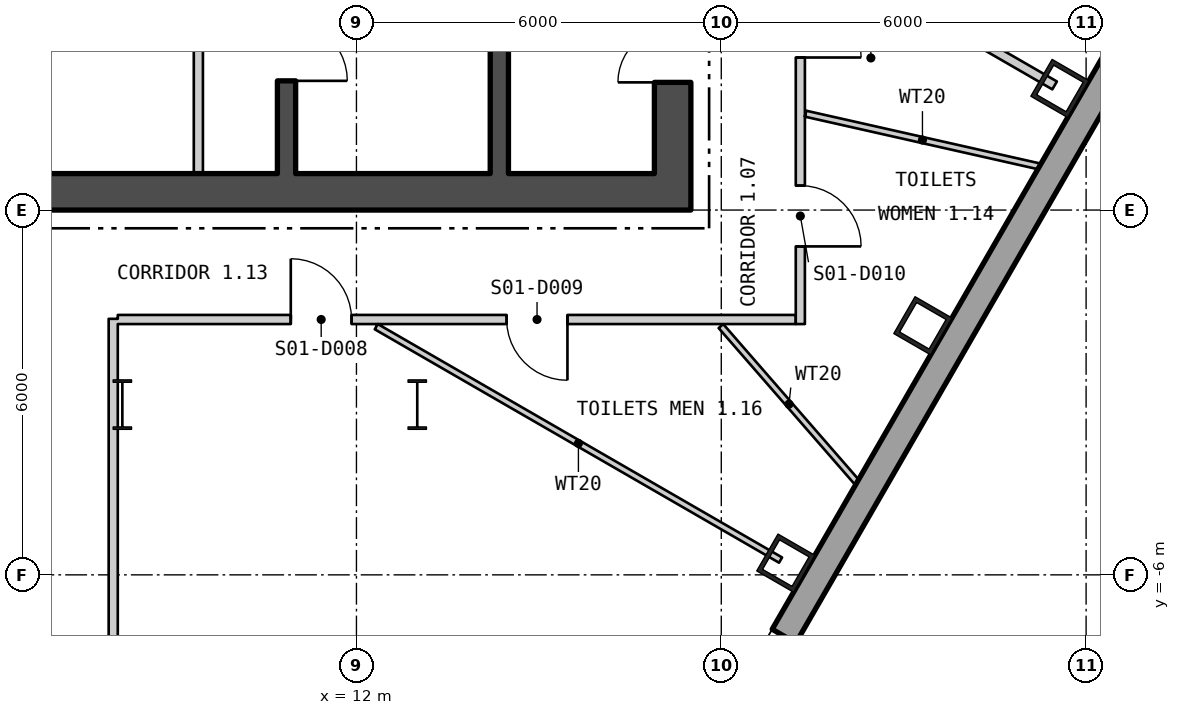
"""IFC4 building model, lengths in metres.
Left out: names, types, materials, properties, quantities, classifications, styles, units other than length and angle.
Written with IfcOpenShell. Run it as: python <this file> out.ifc"""

import sys

from ifc_helpers import new_model, si_unit, direction, frame, frame_2d, origin, origin_2d, place, context, subcontext, project, spatial, polyline, rectangle, hollow_rectangle, i_section, outline, extrude, element, fill, save


model = new_model("IFC4")
c1 = context("Model", 3, precision=1e-05, world=origin(), true_north=direction((0.0, 1.0)))
c2 = subcontext(c1, "Body", "Model", "MODEL_VIEW")
j1 = project(units=[si_unit("LENGTHUNIT", "METRE"), si_unit("PLANEANGLEUNIT", "RADIAN")], contexts=[c1])
p1 = place(None, origin())
s1 = spatial("IfcSite", under=j1, at=p1, CompositionType="ELEMENT")
p2 = place(p1, origin())
s2 = spatial("IfcBuilding", under=s1, at=p2, CompositionType="ELEMENT")
p3 = place(p2, frame((0.0, 0.0, 28.8)))
s3 = spatial("IfcBuildingStorey", under=s2, at=p3, CompositionType="ELEMENT", Elevation=28.8)
p4 = place(p3, frame((19.061, -5.807, 0.0), z_axis=(0.0, 0.0, 1.0), x_axis=(0.5, 0.866025403784, 0.0)))
e1 = element("IfcColumn", 1, at=p4, inside=s3, PredefinedType="COLUMN", context=c2, shape_type="SweptSolid", body=[
    extrude(hollow_rectangle(XDim=0.7, YDim=0.7, WallThickness=0.07, at=origin_2d()), origin(), (0.0, 0.0, 1.0), 4.5),
])
p5 = place(p3, frame((21.315, -1.903, -0.85), z_axis=(0.0, 0.0, 1.0), x_axis=(0.5, 0.866025403784, 0.0)))
e2 = element("IfcColumn", 2, at=p5, inside=s3, PredefinedType="COLUMN", context=c2, shape_type="SweptSolid", body=[
    extrude(hollow_rectangle(XDim=0.7, YDim=0.7, WallThickness=0.07, at=origin_2d()), origin(), (0.0, 0.0, 1.0), 5.35),
])
p6 = place(p3, frame((23.569, 2.0, 0.0), z_axis=(0.0, 0.0, 1.0), x_axis=(0.5, 0.866025403784, 0.0)))
e3 = element("IfcColumn", 3, at=p6, inside=s3, PredefinedType="COLUMN", context=c2, shape_type="SweptSolid", body=[
    extrude(hollow_rectangle(XDim=0.7, YDim=0.7, WallThickness=0.07, at=origin_2d()), origin(), (0.0, 0.0, 1.0), 4.5),
])
for number, where, z_axis, x_axis in (
    (4, (8.15, -3.2, 0.0), (0.0, 0.0, 1.0), (1.0, 0.0, 0.0)),
    (5, (13.0, -3.2, 0.0), (0.0, 0.0, 1.0), (1.0, 0.0, 0.0)),
):
    element("IfcColumn", number, at=place(p3, frame(where, z_axis=z_axis, x_axis=x_axis)), inside=s3, PredefinedType="COLUMN", context=c2, shape_type="SweptSolid", body=[
        extrude(i_section(OverallWidth=0.303, OverallDepth=0.814, WebThickness=0.021, FlangeThickness=0.04, at=origin_2d()), origin(), (0.0, 0.0, 1.0), 4.5),
    ])
p7 = place(p3, frame((5.87, -29.805, -0.23), z_axis=(0.0, 0.0, 1.0), x_axis=(0.499999764979, 0.866025539474, 0.0)))
e6 = element("IfcWall", 6, at=p7, inside=s3, PredefinedType="SOLIDWALL", context=c2, shape_type="SweptSolid", body=[
    extrude(outline(polyline([(-0.13, -0.225), (45.87, -0.225), (45.61, 0.225), (0.13, 0.225), (-0.13, -0.225)])), origin(), (0.0, 0.0, 1.0), 4.55),
])
p8 = place(p7, frame((1.424, 0.0, 1.13)))
e7 = element("IfcOpeningElement", 7, at=p8, cuts=e6, PredefinedType="OPENING", context=c2, shape_type="SweptSolid", body=[
    extrude(rectangle(XDim=2.4, YDim=2.6, at=frame_2d((1.2, 1.3))), frame((0.0, 0.235, 0.0), z_axis=(0.0, -1.0, 0.0), x_axis=(1.0, 0.0, 0.0)), (0.0, 0.0, 1.0), 0.47),
])
p9 = place(p7, frame((5.893, 0.0, 1.13)))
e8 = element("IfcOpeningElement", 8, at=p9, cuts=e6, PredefinedType="OPENING", context=c2, shape_type="SweptSolid", body=[
    extrude(rectangle(XDim=2.4, YDim=2.6, at=frame_2d((1.2, 1.3))), frame((0.0, 0.235, 0.0), z_axis=(0.0, -1.0, 0.0), x_axis=(1.0, 0.0, 0.0)), (0.0, 0.0, 1.0), 0.47),
])
p10 = place(p7, frame((10.701, 0.0, 0.23)))
e9 = element("IfcOpeningElement", 9, at=p10, cuts=e6, PredefinedType="OPENING", context=c2, shape_type="SweptSolid", body=[
    extrude(rectangle(XDim=1.8, YDim=2.4, at=frame_2d((0.9, 1.2))), frame((0.0, 0.235, 0.0), z_axis=(0.0, -1.0, 0.0), x_axis=(1.0, 0.0, 0.0)), (0.0, 0.0, 1.0), 0.47),
])
p11 = place(p7, frame((14.909, 0.0, 1.13)))
e10 = element("IfcOpeningElement", 10, at=p11, cuts=e6, PredefinedType="OPENING", context=c2, shape_type="SweptSolid", body=[
    extrude(rectangle(XDim=2.4, YDim=2.6, at=frame_2d((1.2, 1.3))), frame((0.0, 0.235, 0.0), z_axis=(0.0, -1.0, 0.0), x_axis=(1.0, 0.0, 0.0)), (0.0, 0.0, 1.0), 0.47),
])
p12 = place(p7, frame((19.416, 0.0, 1.13)))
e11 = element("IfcOpeningElement", 11, at=p12, cuts=e6, PredefinedType="OPENING", context=c2, shape_type="SweptSolid", body=[
    extrude(rectangle(XDim=2.4, YDim=2.6, at=frame_2d((1.2, 1.3))), frame((0.0, 0.235, 0.0), z_axis=(0.0, -1.0, 0.0), x_axis=(1.0, 0.0, 0.0)), (0.0, 0.0, 1.0), 0.47),
])
p13 = place(p7, frame((23.924, 0.0, 1.13)))
e12 = element("IfcOpeningElement", 12, at=p13, cuts=e6, PredefinedType="OPENING", context=c2, shape_type="SweptSolid", body=[
    extrude(rectangle(XDim=2.4, YDim=2.6, at=frame_2d((1.2, 1.3))), frame((0.0, 0.235, 0.0), z_axis=(0.0, -1.0, 0.0), x_axis=(1.0, 0.0, 0.0)), (0.0, 0.0, 1.0), 0.47),
])
p14 = place(p7, frame((37.447, 0.0, 1.13)))
e13 = element("IfcOpeningElement", 13, at=p14, cuts=e6, PredefinedType="OPENING", context=c2, shape_type="SweptSolid", body=[
    extrude(rectangle(XDim=2.4, YDim=2.6, at=frame_2d((1.2, 1.3))), frame((0.0, 0.235, 0.0), z_axis=(0.0, -1.0, 0.0), x_axis=(1.0, 0.0, 0.0)), (0.0, 0.0, 1.0), 0.47),
])
p15 = place(p7, frame((42.216, 0.0, 0.23)))
e14 = element("IfcOpeningElement", 14, at=p15, cuts=e6, PredefinedType="OPENING", context=c2, shape_type="SweptSolid", body=[
    extrude(rectangle(XDim=1.8, YDim=2.4, at=frame_2d((0.9, 1.2))), frame((0.0, 0.235, 0.0), z_axis=(0.0, -1.0, 0.0), x_axis=(1.0, 0.0, 0.0)), (0.0, 0.0, 1.0), 0.47),
])
p16 = place(p3, frame((-17.5, 0.3, 0.0), z_axis=(0.0, 0.0, 1.0), x_axis=(1.0, 0.0, 0.0)))
e15 = element("IfcWall", 15, at=p16, inside=s3, PredefinedType="SHEAR", context=c2, shape_type="SweptSolid", body=[
    extrude(rectangle(XDim=35.0, YDim=0.6, at=frame_2d((17.5, 0.0))), origin(), (0.0, 0.0, 1.0), 4.3),
])
p17 = place(p16, frame((12.0, 0.0, 0.0)))
e16 = element("IfcOpeningElement", 16, at=p17, cuts=e15, PredefinedType="OPENING", context=c2, shape_type="SweptSolid", body=[
    extrude(rectangle(XDim=1.8, YDim=2.4, at=frame_2d((0.9, 1.2))), frame((0.0, 0.31, 0.0), z_axis=(0.0, -1.0, 0.0), x_axis=(1.0, 0.0, 0.0)), (0.0, 0.0, 1.0), 0.62),
])
p18 = place(p16, frame((22.0, 0.0, 0.0)))
e17 = element("IfcOpeningElement", 17, at=p18, cuts=e15, PredefinedType="OPENING", context=c2, shape_type="SweptSolid", body=[
    extrude(rectangle(XDim=1.8, YDim=2.4, at=frame_2d((0.9, 1.2))), frame((0.0, 0.31, 0.0), z_axis=(0.0, -1.0, 0.0), x_axis=(1.0, 0.0, 0.0)), (0.0, 0.0, 1.0), 0.62),
])
p19 = place(p3, frame((17.2, 0.6, 0.0), z_axis=(0.0, 0.0, 1.0), x_axis=(0.0, 1.0, 0.0)))
e18 = element("IfcWall", 18, at=p19, inside=s3, PredefinedType="SHEAR", context=c2, shape_type="SweptSolid", body=[
    extrude(rectangle(XDim=16.8, YDim=0.6, at=frame_2d((8.4, 0.0))), origin(), (0.0, 0.0, 1.0), 4.3),
])
p20 = place(p19, frame((5.7, 0.0, 0.0)))
e19 = element("IfcOpeningElement", 19, at=p20, cuts=e18, PredefinedType="OPENING", context=c2, shape_type="SweptSolid", body=[
    extrude(rectangle(XDim=1.5, YDim=2.1, at=frame_2d((0.75, 1.05))), frame((0.0, 0.31, 0.0), z_axis=(0.0, -1.0, 0.0), x_axis=(1.0, 0.0, 0.0)), (0.0, 0.0, 1.0), 0.62),
])
p21 = place(p19, frame((1.5, 0.0, 0.0)))
e20 = element("IfcOpeningElement", 20, at=p21, cuts=e18, PredefinedType="OPENING", context=c2, shape_type="SweptSolid", body=[
    extrude(rectangle(XDim=0.9, YDim=2.1, at=frame_2d((0.45, 1.05))), frame((0.0, 0.31, 0.0), z_axis=(0.0, -1.0, 0.0), x_axis=(1.0, 0.0, 0.0)), (0.0, 0.0, 1.0), 0.62),
])
p22 = place(p19, frame((4.3, 0.0, 0.0)))
e21 = element("IfcOpeningElement", 21, at=p22, cuts=e18, PredefinedType="OPENING", context=c2, shape_type="SweptSolid", body=[
    extrude(rectangle(XDim=1.0, YDim=2.1, at=frame_2d((0.5, 1.05))), frame((0.0, 0.31, 0.0), z_axis=(0.0, -1.0, 0.0), x_axis=(1.0, 0.0, 0.0)), (0.0, 0.0, 1.0), 0.62),
])
p23 = place(p19, frame((8.613, 0.0, 0.0)))
e22 = element("IfcOpeningElement", 22, at=p23, cuts=e18, PredefinedType="OPENING", context=c2, shape_type="SweptSolid", body=[
    extrude(rectangle(XDim=0.9, YDim=2.1, at=frame_2d((0.45, 1.05))), frame((0.0, 0.31, 0.0), z_axis=(0.0, -1.0, 0.0), x_axis=(1.0, 0.0, 0.0)), (0.0, 0.0, 1.0), 0.62),
])
p24 = place(p19, frame((13.413, 0.0, 0.0)))
e23 = element("IfcOpeningElement", 23, at=p24, cuts=e18, PredefinedType="OPENING", context=c2, shape_type="SweptSolid", body=[
    extrude(rectangle(XDim=0.9, YDim=2.1, at=frame_2d((0.45, 1.05))), frame((0.0, 0.31, 0.0), z_axis=(0.0, -1.0, 0.0), x_axis=(1.0, 0.0, 0.0)), (0.0, 0.0, 1.0), 0.62),
])
p25 = place(p3, frame((10.85, 0.6, 0.0), z_axis=(0.0, 0.0, 1.0), x_axis=(0.0, 1.0, 0.0)))
e24 = element("IfcWall", 24, at=p25, inside=s3, PredefinedType="SHEAR", context=c2, shape_type="SweptSolid", body=[
    extrude(rectangle(XDim=16.8, YDim=0.3, at=frame_2d((8.4, 0.0))), origin(), (0.0, 0.0, 1.0), 4.3),
])
p26 = place(p25, frame((5.075, 0.0, 0.0)))
e25 = element("IfcOpeningElement", 25, at=p26, cuts=e24, PredefinedType="OPENING", context=c2, shape_type="SweptSolid", body=[
    extrude(rectangle(XDim=1.25, YDim=2.1, at=frame_2d((0.625, 1.05))), frame((0.0, 0.16, 0.0), z_axis=(0.0, -1.0, 0.0), x_axis=(1.0, 0.0, 0.0)), (0.0, 0.0, 1.0), 0.32),
])
p27 = place(p25, frame((1.525, 0.0, 0.0)))
e26 = element("IfcOpeningElement", 26, at=p27, cuts=e24, PredefinedType="OPENING", context=c2, shape_type="SweptSolid", body=[
    extrude(rectangle(XDim=1.0, YDim=2.1, at=frame_2d((0.5, 1.05))), frame((0.0, 0.16, 0.0), z_axis=(0.0, -1.0, 0.0), x_axis=(1.0, 0.0, 0.0)), (0.0, 0.0, 1.0), 0.32),
])
p28 = place(p3, frame((14.35, 0.6, 0.0), z_axis=(0.0, 0.0, 1.0), x_axis=(0.0, 1.0, 0.0)))
e27 = element("IfcWall", 27, at=p28, inside=s3, PredefinedType="SHEAR", context=c2, shape_type="SweptSolid", body=[
    extrude(rectangle(XDim=16.8, YDim=0.3, at=frame_2d((8.4, 0.0))), origin(), (0.0, 0.0, 1.0), 4.3),
])
p29 = place(p28, frame((5.7, 0.0, 0.0)))
e28 = element("IfcOpeningElement", 28, at=p29, cuts=e27, PredefinedType="OPENING", context=c2, shape_type="SweptSolid", body=[
    extrude(rectangle(XDim=1.5, YDim=2.1, at=frame_2d((0.75, 1.05))), frame((0.0, 0.16, 0.0), z_axis=(0.0, -1.0, 0.0), x_axis=(1.0, 0.0, 0.0)), (0.0, 0.0, 1.0), 0.32),
])
p30 = place(p3, frame((9.4, 0.6, 0.0), z_axis=(0.0, 0.0, 1.0), x_axis=(0.0, 1.0, 0.0)))
e29 = element("IfcWall", 29, at=p30, inside=s3, PredefinedType="PARTITIONING", context=c2, shape_type="SweptSolid", body=[
    extrude(rectangle(XDim=3.275, YDim=0.15, at=frame_2d((1.637, 0.0))), origin(), (0.0, 0.0, 1.0), 4.3),
])
p31 = place(p3, frame((8.0, -13.675, 0.0), z_axis=(0.0, 0.0, 1.0), x_axis=(0.0, 1.0, 0.0)))
e30 = element("IfcWall", 30, at=p31, inside=s3, PredefinedType="PARTITIONING", context=c2, shape_type="SweptSolid", body=[
    extrude(rectangle(XDim=10.475, YDim=0.15, at=frame_2d((5.237, 0.0))), origin(), (0.0, 0.0, 1.0), 3.61),
])
p32 = place(p3, frame((8.0, -3.2, 0.0), z_axis=(0.0, 0.0, 1.0), x_axis=(0.0, 1.0, 0.0)))
e31 = element("IfcWall", 31, at=p32, inside=s3, PredefinedType="PARTITIONING", context=c2, shape_type="SweptSolid", body=[
    extrude(rectangle(XDim=1.411, YDim=0.15, at=frame_2d((0.706, 0.0))), origin(), (0.0, 0.0, 1.0), 4.3),
])
p33 = place(p3, frame((8.075, -1.8, 0.0), z_axis=(0.0, 0.0, 1.0), x_axis=(1.0, 0.0, 0.0)))
e32 = element("IfcWall", 32, at=p33, inside=s3, PredefinedType="PARTITIONING", context=c2, shape_type="SweptSolid", body=[
    extrude(rectangle(XDim=11.15, YDim=0.15, at=frame_2d((5.575, 0.0))), origin(), (0.0, 0.0, 1.0), 4.3),
])
p34 = place(p33, frame((2.845, 0.0, 0.0)))
e33 = element("IfcOpeningElement", 33, at=p34, cuts=e32, PredefinedType="OPENING", context=c2, shape_type="SweptSolid", body=[
    extrude(rectangle(XDim=1.0, YDim=2.1, at=frame_2d((0.5, 1.05))), frame((0.0, 0.085, 0.0), z_axis=(0.0, -1.0, 0.0), x_axis=(1.0, 0.0, 0.0)), (0.0, 0.0, 1.0), 0.17),
])
p35 = place(p33, frame((6.395, 0.0, 0.0)))
e34 = element("IfcOpeningElement", 34, at=p35, cuts=e32, PredefinedType="OPENING", context=c2, shape_type="SweptSolid", body=[
    extrude(rectangle(XDim=1.0, YDim=2.1, at=frame_2d((0.5, 1.05))), frame((0.0, 0.085, 0.0), z_axis=(0.0, -1.0, 0.0), x_axis=(1.0, 0.0, 0.0)), (0.0, 0.0, 1.0), 0.17),
])
p36 = place(p3, frame((12.326, -1.918, 0.0), z_axis=(0.0, 0.0, 1.0), x_axis=(0.866014233227, -0.500019347474, 0.0)))
e35 = element("IfcWall", 35, at=p36, inside=s3, PredefinedType="PARTITIONING", context=c2, shape_type="SweptSolid", body=[
    extrude(rectangle(XDim=7.678, YDim=0.1, at=frame_2d((3.839, 0.0))), origin(), (0.0, 0.0, 1.0), 4.3),
])
p37 = place(p3, frame((17.994, -1.908, 0.0), z_axis=(0.0, 0.0, 1.0), x_axis=(0.656716151121, -0.754137850036, 0.0)))
e36 = element("IfcWall", 36, at=p37, inside=s3, PredefinedType="PARTITIONING", context=c2, shape_type="SweptSolid", body=[
    extrude(rectangle(XDim=3.408, YDim=0.1, at=frame_2d((1.704, 0.0))), origin(), (0.0, 0.0, 1.0), 4.3),
])
p38 = place(p3, frame((19.3, -1.875, 0.0), z_axis=(0.0, 0.0, 1.0), x_axis=(6.6476102e-05, 0.99999999779, 0.0)))
e37 = element("IfcWall", 37, at=p38, inside=s3, PredefinedType="PARTITIONING", context=c2, shape_type="SweptSolid", body=[
    extrude(rectangle(XDim=15.043, YDim=0.15, at=frame_2d((7.521, 0.0))), origin(), (0.0, 0.0, 1.0), 4.3),
])
p39 = place(p38, frame((1.277, 0.0, 0.0)))
e38 = element("IfcOpeningElement", 38, at=p39, cuts=e37, PredefinedType="OPENING", context=c2, shape_type="SweptSolid", body=[
    extrude(rectangle(XDim=1.0, YDim=2.1, at=frame_2d((0.5, 1.05))), frame((0.0, 0.085, 0.0), z_axis=(0.0, -1.0, 0.0), x_axis=(1.0, 0.0, 0.0)), (0.0, 0.0, 1.0), 0.17),
])
p40 = place(p38, frame((4.384, 0.0, 0.0)))
e39 = element("IfcOpeningElement", 39, at=p40, cuts=e37, PredefinedType="OPENING", context=c2, shape_type="SweptSolid", body=[
    extrude(rectangle(XDim=1.0, YDim=2.1, at=frame_2d((0.5, 1.05))), frame((0.0, 0.085, 0.0), z_axis=(0.0, -1.0, 0.0), x_axis=(1.0, 0.0, 0.0)), (0.0, 0.0, 1.0), 0.17),
])
p41 = place(p38, frame((8.392, 0.0, 0.0)))
e40 = element("IfcOpeningElement", 40, at=p41, cuts=e37, PredefinedType="OPENING", context=c2, shape_type="SweptSolid", body=[
    extrude(rectangle(XDim=1.0, YDim=2.1, at=frame_2d((0.5, 1.05))), frame((0.0, 0.085, 0.0), z_axis=(0.0, -1.0, 0.0), x_axis=(1.0, 0.0, 0.0)), (0.0, 0.0, 1.0), 0.17),
])
p42 = place(p38, frame((12.769, 0.0, 0.0)))
e41 = element("IfcOpeningElement", 41, at=p42, cuts=e37, PredefinedType="OPENING", context=c2, shape_type="SweptSolid", body=[
    extrude(rectangle(XDim=1.0, YDim=2.1, at=frame_2d((0.5, 1.05))), frame((0.0, 0.085, 0.0), z_axis=(0.0, -1.0, 0.0), x_axis=(1.0, 0.0, 0.0)), (0.0, 0.0, 1.0), 0.17),
])
p43 = place(p3, frame((19.386, 1.585, 0.0), z_axis=(0.0, 0.0, 1.0), x_axis=(0.975507775366, -0.219964952209, 0.0)))
e42 = element("IfcWall", 42, at=p43, inside=s3, PredefinedType="PARTITIONING", context=c2, shape_type="SweptSolid", body=[
    extrude(rectangle(XDim=3.942, YDim=0.1, at=frame_2d((1.971, 0.0))), origin(), (0.0, 0.0, 1.0), 4.3),
])
p44 = place(p3, frame((19.413, 4.4, 0.0), z_axis=(0.0, 0.0, 1.0), x_axis=(0.865955197451, -0.500121581226, 0.0)))
e43 = element("IfcWall", 43, at=p44, inside=s3, PredefinedType="PARTITIONING", context=c2, shape_type="SweptSolid", body=[
    extrude(rectangle(XDim=4.699, YDim=0.15, at=frame_2d((2.349, 0.0))), origin(), (0.0, 0.0, 1.0), 4.3),
])
p45 = place(p13, origin())
e44 = element("IfcWindow", 44, at=p45, inside=s3, PartitioningType="SINGLE_PANEL", PredefinedType="WINDOW", context=c2, shape_type="SweptSolid", body=[
    extrude(rectangle(XDim=2.4, YDim=2.6, at=frame_2d((1.2, 1.3))), frame((0.0, 0.105, 0.0), z_axis=(0.0, -1.0, 0.0), x_axis=(1.0, 0.0, 0.0)), (0.0, 0.0, 1.0), 0.06),
])
fill(e12, e44)
p46 = place(p27, origin())
e45 = element("IfcDoor", 45, at=p46, inside=s3, OperationType="SINGLE_SWING_LEFT", PredefinedType="DOOR", context=c2, shape_type="SweptSolid", body=[
    extrude(rectangle(XDim=1.0, YDim=2.1, at=frame_2d((0.5, 1.05))), frame((0.0, 0.025, 0.0), z_axis=(0.0, -1.0, 0.0), x_axis=(1.0, 0.0, 0.0)), (0.0, 0.0, 1.0), 0.05),
])
fill(e26, e45)
p47 = place(p21, origin())
e46 = element("IfcDoor", 46, at=p47, inside=s3, OperationType="SINGLE_SWING_RIGHT", PredefinedType="DOOR", context=c2, shape_type="SweptSolid", body=[
    extrude(rectangle(XDim=0.9, YDim=2.1, at=frame_2d((0.45, 1.05))), frame((0.0, 0.025, 0.0), z_axis=(0.0, -1.0, 0.0), x_axis=(1.0, 0.0, 0.0)), (0.0, 0.0, 1.0), 0.05),
])
fill(e20, e46)
p48 = place(p34, origin())
e47 = element("IfcDoor", 47, at=p48, inside=s3, OperationType="SINGLE_SWING_RIGHT", PredefinedType="DOOR", context=c2, shape_type="SweptSolid", body=[
    extrude(rectangle(XDim=1.0, YDim=2.1, at=frame_2d((0.5, 1.05))), frame((0.0, 0.025, 0.0), z_axis=(0.0, -1.0, 0.0), x_axis=(1.0, 0.0, 0.0)), (0.0, 0.0, 1.0), 0.05),
])
fill(e33, e47)
p49 = place(p35, origin())
e48 = element("IfcDoor", 48, at=p49, inside=s3, OperationType="SINGLE_SWING_RIGHT", PredefinedType="DOOR", context=c2, shape_type="SweptSolid", body=[
    extrude(rectangle(XDim=1.0, YDim=2.1, at=frame_2d((0.5, 1.05))), frame((0.0, 0.025, 0.0), z_axis=(0.0, -1.0, 0.0), x_axis=(1.0, 0.0, 0.0)), (0.0, 0.0, 1.0), 0.05),
])
fill(e34, e48)
p50 = place(p39, origin())
e49 = element("IfcDoor", 49, at=p50, inside=s3, OperationType="SINGLE_SWING_LEFT", PredefinedType="DOOR", context=c2, shape_type="SweptSolid", body=[
    extrude(rectangle(XDim=1.0, YDim=2.1, at=frame_2d((0.5, 1.05))), frame((0.0, 0.025, 0.0), z_axis=(0.0, -1.0, 0.0), x_axis=(1.0, 0.0, 0.0)), (0.0, 0.0, 1.0), 0.05),
])
fill(e38, e49)
p51 = place(p40, origin())
e50 = element("IfcDoor", 50, at=p51, inside=s3, OperationType="SINGLE_SWING_LEFT", PredefinedType="DOOR", context=c2, shape_type="SweptSolid", body=[
    extrude(rectangle(XDim=1.0, YDim=2.1, at=frame_2d((0.5, 1.05))), frame((0.0, 0.025, 0.0), z_axis=(0.0, -1.0, 0.0), x_axis=(1.0, 0.0, 0.0)), (0.0, 0.0, 1.0), 0.05),
])
fill(e39, e50)
save(model, sys.argv[1])
